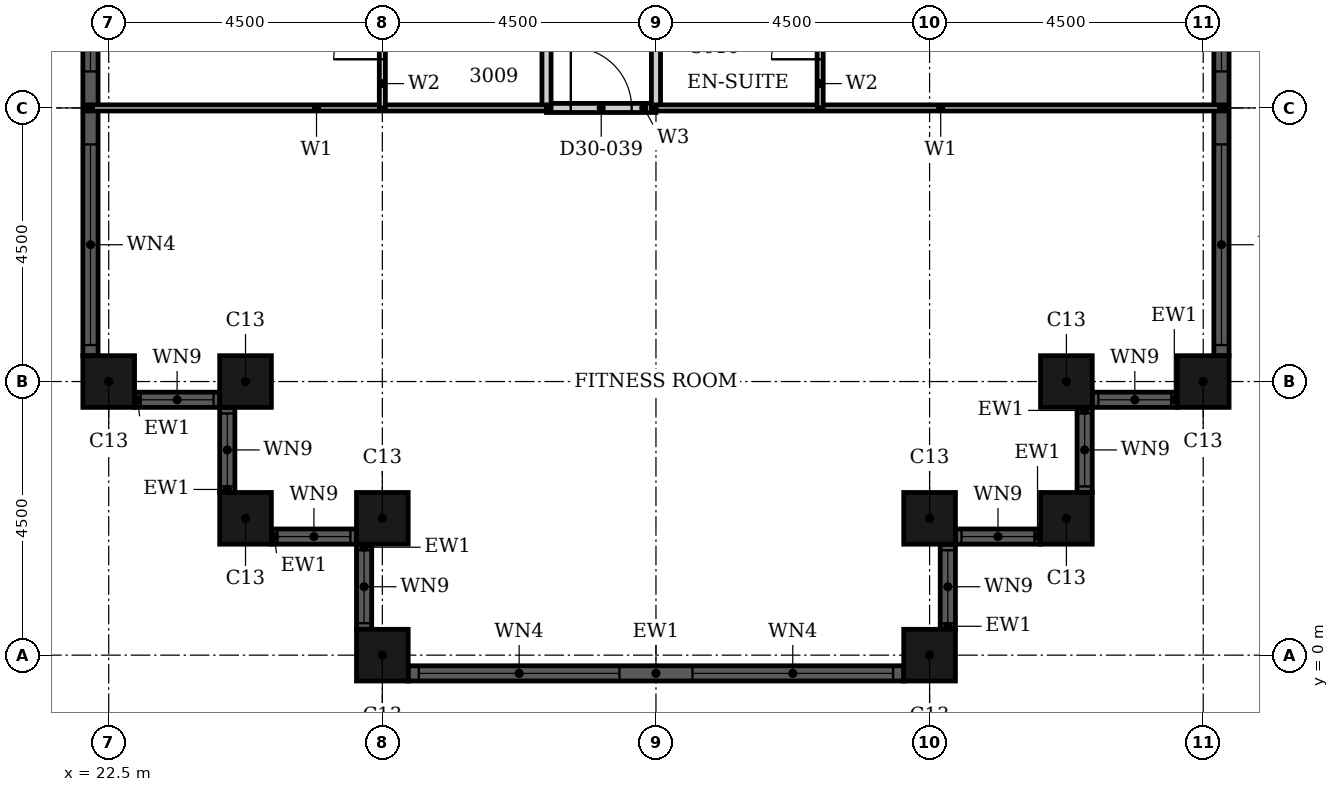
"""IFC4 building model, lengths in metres.
Left out: names, types, materials, properties, quantities, classifications, styles, units other than length and angle.
Written with IfcOpenShell. Run it as: python <this file> out.ifc"""

import sys

from ifc_helpers import new_model, si_unit, direction, frame, frame_2d, origin, origin_2d, place, context, subcontext, project, spatial, rectangle, hollow_rectangle, extrude, element, fill, save


model = new_model("IFC4")
c1 = context("Model", 3, precision=1e-05, world=origin(), true_north=direction((0.0, 1.0)))
c2 = subcontext(c1, "Body", "Model", "MODEL_VIEW")
j1 = project(units=[si_unit("LENGTHUNIT", "METRE"), si_unit("PLANEANGLEUNIT", "RADIAN")], contexts=[c1])
p1 = place(None, origin())
s1 = spatial("IfcSite", under=j1, at=p1, CompositionType="ELEMENT")
p2 = place(p1, origin())
s2 = spatial("IfcBuilding", under=s1, at=p2, CompositionType="ELEMENT")
p3 = place(p2, frame((0.0, 0.0, 122.4)))
s3 = spatial("IfcBuildingStorey", under=s2, at=p3, CompositionType="ELEMENT", Elevation=122.4)
for number, where, z_axis, x_axis in (
    (1, (22.5, 4.5, 0.0), (0.0, 0.0, 1.0), (1.0, 0.0, 0.0)),
    (2, (24.75, 4.5, 0.0), (0.0, 0.0, 1.0), (1.0, 0.0, 0.0)),
    (3, (24.75, 2.25, 0.0), (0.0, 0.0, 1.0), (1.0, 0.0, 0.0)),
    (4, (27.0, 2.25, 0.0), (0.0, 0.0, 1.0), (1.0, 0.0, 0.0)),
    (5, (27.0, 0.0, 0.0), (0.0, 0.0, 1.0), (1.0, 0.0, 0.0)),
    (6, (36.0, 0.0, 0.0), (0.0, 0.0, 1.0), (1.0, 0.0, 0.0)),
    (7, (36.0, 2.25, 0.0), (0.0, 0.0, 1.0), (1.0, 0.0, 0.0)),
    (8, (38.25, 2.25, 0.0), (0.0, 0.0, 1.0), (1.0, 0.0, 0.0)),
    (9, (38.25, 4.5, 0.0), (0.0, 0.0, 1.0), (1.0, 0.0, 0.0)),
    (10, (40.5, 4.5, 0.0), (0.0, 0.0, 1.0), (1.0, 0.0, 0.0)),
):
    element("IfcColumn", number, at=place(p3, frame(where, z_axis=z_axis, x_axis=x_axis)), inside=s3, PredefinedType="COLUMN", context=c2, shape_type="SweptSolid", body=[
        extrude(hollow_rectangle(XDim=0.85, YDim=0.85, WallThickness=0.026, at=origin_2d()), origin(), (0.0, 0.0, 1.0), 3.6),
    ])
p4 = place(p3, frame((22.925, 4.2, 0.0), z_axis=(0.0, 0.0, 1.0), x_axis=(1.0, 0.0, 0.0)))
e11 = element("IfcWall", 11, at=p4, inside=s3, PredefinedType="SOLIDWALL", context=c2, shape_type="SweptSolid", body=[
    extrude(rectangle(XDim=1.4, YDim=0.25, at=frame_2d((0.7, 0.0))), origin(), (0.0, 0.0, 1.0), 3.6),
])
p5 = place(p4, frame((0.1, 0.0, 0.9)))
e12 = element("IfcOpeningElement", 12, at=p5, cuts=e11, PredefinedType="OPENING", context=c2, shape_type="SweptSolid", body=[
    extrude(rectangle(XDim=1.2, YDim=2.08, at=frame_2d((0.6, 1.04))), frame((0.0, 0.135, 0.0), z_axis=(0.0, -1.0, 0.0), x_axis=(1.0, 0.0, 0.0)), (0.0, 0.0, 1.0), 0.27),
])
p6 = place(p3, frame((24.45, 4.075, 0.0), z_axis=(0.0, 0.0, 1.0), x_axis=(0.0, -1.0, 0.0)))
e13 = element("IfcWall", 13, at=p6, inside=s3, PredefinedType="SOLIDWALL", context=c2, shape_type="SweptSolid", body=[
    extrude(rectangle(XDim=1.4, YDim=0.25, at=frame_2d((0.7, 0.0))), origin(), (0.0, 0.0, 1.0), 3.6),
])
p7 = place(p6, frame((0.1, 0.0, 0.9)))
e14 = element("IfcOpeningElement", 14, at=p7, cuts=e13, PredefinedType="OPENING", context=c2, shape_type="SweptSolid", body=[
    extrude(rectangle(XDim=1.2, YDim=2.08, at=frame_2d((0.6, 1.04))), frame((0.0, 0.135, 0.0), z_axis=(0.0, -1.0, 0.0), x_axis=(1.0, 0.0, 0.0)), (0.0, 0.0, 1.0), 0.27),
])
p8 = place(p3, frame((25.175, 1.95, 0.0), z_axis=(0.0, 0.0, 1.0), x_axis=(1.0, 0.0, 0.0)))
e15 = element("IfcWall", 15, at=p8, inside=s3, PredefinedType="SOLIDWALL", context=c2, shape_type="SweptSolid", body=[
    extrude(rectangle(XDim=1.4, YDim=0.25, at=frame_2d((0.7, 0.0))), origin(), (0.0, 0.0, 1.0), 3.6),
])
p9 = place(p8, frame((0.1, 0.0, 0.9)))
e16 = element("IfcOpeningElement", 16, at=p9, cuts=e15, PredefinedType="OPENING", context=c2, shape_type="SweptSolid", body=[
    extrude(rectangle(XDim=1.2, YDim=2.08, at=frame_2d((0.6, 1.04))), frame((0.0, 0.135, 0.0), z_axis=(0.0, -1.0, 0.0), x_axis=(1.0, 0.0, 0.0)), (0.0, 0.0, 1.0), 0.27),
])
p10 = place(p3, frame((26.7, 1.825, 0.0), z_axis=(0.0, 0.0, 1.0), x_axis=(0.0, -1.0, 0.0)))
e17 = element("IfcWall", 17, at=p10, inside=s3, PredefinedType="SOLIDWALL", context=c2, shape_type="SweptSolid", body=[
    extrude(rectangle(XDim=1.4, YDim=0.25, at=frame_2d((0.7, 0.0))), origin(), (0.0, 0.0, 1.0), 3.6),
])
p11 = place(p10, frame((0.1, 0.0, 0.9)))
e18 = element("IfcOpeningElement", 18, at=p11, cuts=e17, PredefinedType="OPENING", context=c2, shape_type="SweptSolid", body=[
    extrude(rectangle(XDim=1.2, YDim=2.08, at=frame_2d((0.6, 1.04))), frame((0.0, 0.135, 0.0), z_axis=(0.0, -1.0, 0.0), x_axis=(1.0, 0.0, 0.0)), (0.0, 0.0, 1.0), 0.27),
])
p12 = place(p3, frame((27.425, -0.3, 0.0), z_axis=(0.0, 0.0, 1.0), x_axis=(1.0, 0.0, 0.0)))
e19 = element("IfcWall", 19, at=p12, inside=s3, PredefinedType="SOLIDWALL", context=c2, shape_type="SweptSolid", body=[
    extrude(rectangle(XDim=8.15, YDim=0.25, at=frame_2d((4.075, 0.0))), origin(), (0.0, 0.0, 1.0), 3.6),
])
p13 = place(p12, frame((0.175, 0.0, 0.9)))
e20 = element("IfcOpeningElement", 20, at=p13, cuts=e19, PredefinedType="OPENING", context=c2, shape_type="SweptSolid", body=[
    extrude(rectangle(XDim=3.3, YDim=2.08, at=frame_2d((1.65, 1.04))), frame((0.0, 0.135, 0.0), z_axis=(0.0, -1.0, 0.0), x_axis=(1.0, 0.0, 0.0)), (0.0, 0.0, 1.0), 0.27),
])
p14 = place(p12, frame((4.675, 0.0, 0.9)))
e21 = element("IfcOpeningElement", 21, at=p14, cuts=e19, PredefinedType="OPENING", context=c2, shape_type="SweptSolid", body=[
    extrude(rectangle(XDim=3.3, YDim=2.08, at=frame_2d((1.65, 1.04))), frame((0.0, 0.135, 0.0), z_axis=(0.0, -1.0, 0.0), x_axis=(1.0, 0.0, 0.0)), (0.0, 0.0, 1.0), 0.27),
])
p15 = place(p3, frame((36.3, 0.425, 0.0), z_axis=(0.0, 0.0, 1.0), x_axis=(0.0, 1.0, 0.0)))
e22 = element("IfcWall", 22, at=p15, inside=s3, PredefinedType="SOLIDWALL", context=c2, shape_type="SweptSolid", body=[
    extrude(rectangle(XDim=1.4, YDim=0.25, at=frame_2d((0.7, 0.0))), origin(), (0.0, 0.0, 1.0), 3.6),
])
p16 = place(p15, frame((0.1, 0.0, 0.9)))
e23 = element("IfcOpeningElement", 23, at=p16, cuts=e22, PredefinedType="OPENING", context=c2, shape_type="SweptSolid", body=[
    extrude(rectangle(XDim=1.2, YDim=2.08, at=frame_2d((0.6, 1.04))), frame((0.0, 0.135, 0.0), z_axis=(0.0, -1.0, 0.0), x_axis=(1.0, 0.0, 0.0)), (0.0, 0.0, 1.0), 0.27),
])
p17 = place(p3, frame((36.425, 1.95, 0.0), z_axis=(0.0, 0.0, 1.0), x_axis=(1.0, 0.0, 0.0)))
e24 = element("IfcWall", 24, at=p17, inside=s3, PredefinedType="SOLIDWALL", context=c2, shape_type="SweptSolid", body=[
    extrude(rectangle(XDim=1.4, YDim=0.25, at=frame_2d((0.7, 0.0))), origin(), (0.0, 0.0, 1.0), 3.6),
])
p18 = place(p17, frame((0.1, 0.0, 0.9)))
e25 = element("IfcOpeningElement", 25, at=p18, cuts=e24, PredefinedType="OPENING", context=c2, shape_type="SweptSolid", body=[
    extrude(rectangle(XDim=1.2, YDim=2.08, at=frame_2d((0.6, 1.04))), frame((0.0, 0.135, 0.0), z_axis=(0.0, -1.0, 0.0), x_axis=(1.0, 0.0, 0.0)), (0.0, 0.0, 1.0), 0.27),
])
p19 = place(p3, frame((38.55, 2.675, 0.0), z_axis=(0.0, 0.0, 1.0), x_axis=(0.0, 1.0, 0.0)))
e26 = element("IfcWall", 26, at=p19, inside=s3, PredefinedType="SOLIDWALL", context=c2, shape_type="SweptSolid", body=[
    extrude(rectangle(XDim=1.4, YDim=0.25, at=frame_2d((0.7, 0.0))), origin(), (0.0, 0.0, 1.0), 3.6),
])
p20 = place(p19, frame((0.1, 0.0, 0.9)))
e27 = element("IfcOpeningElement", 27, at=p20, cuts=e26, PredefinedType="OPENING", context=c2, shape_type="SweptSolid", body=[
    extrude(rectangle(XDim=1.2, YDim=2.08, at=frame_2d((0.6, 1.04))), frame((0.0, 0.135, 0.0), z_axis=(0.0, -1.0, 0.0), x_axis=(1.0, 0.0, 0.0)), (0.0, 0.0, 1.0), 0.27),
])
p21 = place(p3, frame((38.675, 4.2, 0.0), z_axis=(0.0, 0.0, 1.0), x_axis=(1.0, 0.0, 0.0)))
e28 = element("IfcWall", 28, at=p21, inside=s3, PredefinedType="SOLIDWALL", context=c2, shape_type="SweptSolid", body=[
    extrude(rectangle(XDim=1.4, YDim=0.25, at=frame_2d((0.7, 0.0))), origin(), (0.0, 0.0, 1.0), 3.6),
])
p22 = place(p21, frame((0.1, 0.0, 0.9)))
e29 = element("IfcOpeningElement", 29, at=p22, cuts=e28, PredefinedType="OPENING", context=c2, shape_type="SweptSolid", body=[
    extrude(rectangle(XDim=1.2, YDim=2.08, at=frame_2d((0.6, 1.04))), frame((0.0, 0.135, 0.0), z_axis=(0.0, -1.0, 0.0), x_axis=(1.0, 0.0, 0.0)), (0.0, 0.0, 1.0), 0.27),
])
p23 = place(p3, frame((40.8, 4.925, 0.0), z_axis=(0.0, 0.0, 1.0), x_axis=(0.0, 1.0, 0.0)))
e30 = element("IfcWall", 30, at=p23, inside=s3, PredefinedType="SOLIDWALL", context=c2, shape_type="SweptSolid", body=[
    extrude(rectangle(XDim=8.15, YDim=0.25, at=frame_2d((4.075, 0.0))), origin(), (0.0, 0.0, 1.0), 3.6),
])
p24 = place(p23, frame((0.175, 0.0, 0.9)))
e31 = element("IfcOpeningElement", 31, at=p24, cuts=e30, PredefinedType="OPENING", context=c2, shape_type="SweptSolid", body=[
    extrude(rectangle(XDim=3.3, YDim=2.08, at=frame_2d((1.65, 1.04))), frame((0.0, 0.135, 0.0), z_axis=(0.0, -1.0, 0.0), x_axis=(1.0, 0.0, 0.0)), (0.0, 0.0, 1.0), 0.27),
])
p25 = place(p23, frame((4.675, 0.0, 0.9)))
e32 = element("IfcOpeningElement", 32, at=p25, cuts=e30, PredefinedType="OPENING", context=c2, shape_type="SweptSolid", body=[
    extrude(rectangle(XDim=3.3, YDim=2.08, at=frame_2d((1.65, 1.04))), frame((0.0, 0.135, 0.0), z_axis=(0.0, -1.0, 0.0), x_axis=(1.0, 0.0, 0.0)), (0.0, 0.0, 1.0), 0.27),
])
p26 = place(p3, frame((22.2, 13.075, 0.0), z_axis=(0.0, 0.0, 1.0), x_axis=(0.0, -1.0, 0.0)))
e33 = element("IfcWall", 33, at=p26, inside=s3, PredefinedType="SOLIDWALL", context=c2, shape_type="SweptSolid", body=[
    extrude(rectangle(XDim=8.15, YDim=0.25, at=frame_2d((4.075, 0.0))), origin(), (0.0, 0.0, 1.0), 3.6),
])
p27 = place(p26, frame((0.175, 0.0, 0.9)))
e34 = element("IfcOpeningElement", 34, at=p27, cuts=e33, PredefinedType="OPENING", context=c2, shape_type="SweptSolid", body=[
    extrude(rectangle(XDim=3.3, YDim=2.08, at=frame_2d((1.65, 1.04))), frame((0.0, 0.135, 0.0), z_axis=(0.0, -1.0, 0.0), x_axis=(1.0, 0.0, 0.0)), (0.0, 0.0, 1.0), 0.27),
])
p28 = place(p26, frame((4.675, 0.0, 0.9)))
e35 = element("IfcOpeningElement", 35, at=p28, cuts=e33, PredefinedType="OPENING", context=c2, shape_type="SweptSolid", body=[
    extrude(rectangle(XDim=3.3, YDim=2.08, at=frame_2d((1.65, 1.04))), frame((0.0, 0.135, 0.0), z_axis=(0.0, -1.0, 0.0), x_axis=(1.0, 0.0, 0.0)), (0.0, 0.0, 1.0), 0.27),
])
p29 = place(p3, frame((29.7, 9.0, 0.0), z_axis=(0.0, 0.0, 1.0), x_axis=(1.0, 0.0, 0.0)))
e36 = element("IfcWall", 36, at=p29, inside=s3, PredefinedType="PARTITIONING", context=c2, shape_type="SweptSolid", body=[
    extrude(rectangle(XDim=1.8, YDim=0.15, at=frame_2d((0.9, 0.0))), origin(), (0.0, 0.0, 1.0), 3.3),
])
p30 = place(p29, frame((0.4, 0.0, 0.0)))
e37 = element("IfcOpeningElement", 37, at=p30, cuts=e36, PredefinedType="OPENING", context=c2, shape_type="SweptSolid", body=[
    extrude(rectangle(XDim=1.0, YDim=2.1, at=frame_2d((0.5, 1.05))), frame((0.0, 0.085, 0.0), z_axis=(0.0, -1.0, 0.0), x_axis=(1.0, 0.0, 0.0)), (0.0, 0.0, 1.0), 0.17),
])
p31 = place(p3, frame((29.7, 9.0, 0.0), z_axis=(0.0, 0.0, 1.0), x_axis=(0.0, 1.0, 0.0)))
e38 = element("IfcWall", 38, at=p31, inside=s3, PredefinedType="PARTITIONING", context=c2, shape_type="SweptSolid", body=[
    extrude(rectangle(XDim=11.7, YDim=0.15, at=frame_2d((5.85, 0.0))), origin(), (0.0, 0.0, 1.0), 3.3),
])
p32 = place(p31, frame((2.95, 0.0, 0.0)))
e39 = element("IfcOpeningElement", 39, at=p32, cuts=e38, PredefinedType="OPENING", context=c2, shape_type="SweptSolid", body=[
    extrude(rectangle(XDim=1.0, YDim=2.1, at=frame_2d((0.5, 1.05))), frame((0.0, 0.085, 0.0), z_axis=(0.0, -1.0, 0.0), x_axis=(1.0, 0.0, 0.0)), (0.0, 0.0, 1.0), 0.17),
])
p33 = place(p3, frame((31.5, 9.0, 0.0), z_axis=(0.0, 0.0, 1.0), x_axis=(0.0, 1.0, 0.0)))
e40 = element("IfcWall", 40, at=p33, inside=s3, PredefinedType="PARTITIONING", context=c2, shape_type="SweptSolid", body=[
    extrude(rectangle(XDim=11.7, YDim=0.15, at=frame_2d((5.85, 0.0))), origin(), (0.0, 0.0, 1.0), 2.58),
])
p34 = place(p33, frame((2.95, 0.0, 0.0)))
e41 = element("IfcOpeningElement", 41, at=p34, cuts=e40, PredefinedType="OPENING", context=c2, shape_type="SweptSolid", body=[
    extrude(rectangle(XDim=1.0, YDim=2.1, at=frame_2d((0.5, 1.05))), frame((0.0, 0.085, 0.0), z_axis=(0.0, -1.0, 0.0), x_axis=(1.0, 0.0, 0.0)), (0.0, 0.0, 1.0), 0.17),
])
p35 = place(p3, frame((31.5, 9.0, 0.0), z_axis=(0.0, 0.0, 1.0), x_axis=(1.0, 0.0, 0.0)))
e42 = element("IfcWall", 42, at=p35, inside=s3, PredefinedType="PARTITIONING", context=c2, shape_type="SweptSolid", body=[
    extrude(rectangle(XDim=9.365, YDim=0.1, at=frame_2d((4.683, 0.0))), origin(), (0.0, 0.0, 1.0), 3.3),
])
p36 = place(p3, frame((22.135, 9.0, 0.0), z_axis=(0.0, 0.0, 1.0), x_axis=(1.0, 0.0, 0.0)))
e43 = element("IfcWall", 43, at=p36, inside=s3, PredefinedType="PARTITIONING", context=c2, shape_type="SweptSolid", body=[
    extrude(rectangle(XDim=7.565, YDim=0.1, at=frame_2d((3.782, 0.0))), origin(), (0.0, 0.0, 1.0), 3.3),
])
p37 = place(p3, frame((27.0, 9.0, 0.0), z_axis=(0.0, 0.0, 1.0), x_axis=(0.0, 1.0, 0.0)))
e44 = element("IfcWall", 44, at=p37, inside=s3, PredefinedType="PARTITIONING", context=c2, shape_type="SweptSolid", body=[
    extrude(rectangle(XDim=2.4, YDim=0.1, at=frame_2d((1.2, 0.0))), origin(), (0.0, 0.0, 1.0), 2.58),
])
p38 = place(p37, frame((0.8, 0.0, 0.0)))
e45 = element("IfcOpeningElement", 45, at=p38, cuts=e44, PredefinedType="OPENING", context=c2, shape_type="SweptSolid", body=[
    extrude(rectangle(XDim=0.8, YDim=2.1, at=frame_2d((0.4, 1.05))), frame((0.0, 0.06, 0.0), z_axis=(0.0, -1.0, 0.0), x_axis=(1.0, 0.0, 0.0)), (0.0, 0.0, 1.0), 0.12),
])
p39 = place(p3, frame((34.2, 9.0, 0.0), z_axis=(0.0, 0.0, 1.0), x_axis=(0.0, 1.0, 0.0)))
e46 = element("IfcWall", 46, at=p39, inside=s3, PredefinedType="PARTITIONING", context=c2, shape_type="SweptSolid", body=[
    extrude(rectangle(XDim=2.4, YDim=0.1, at=frame_2d((1.2, 0.0))), origin(), (0.0, 0.0, 1.0), 3.3),
])
p40 = place(p39, frame((0.8, 0.0, 0.0)))
e47 = element("IfcOpeningElement", 47, at=p40, cuts=e46, PredefinedType="OPENING", context=c2, shape_type="SweptSolid", body=[
    extrude(rectangle(XDim=0.8, YDim=2.1, at=frame_2d((0.4, 1.05))), frame((0.0, 0.06, 0.0), z_axis=(0.0, -1.0, 0.0), x_axis=(1.0, 0.0, 0.0)), (0.0, 0.0, 1.0), 0.12),
])
p41 = place(p5, origin())
e48 = element("IfcWindow", 48, at=p41, inside=s3, PartitioningType="SINGLE_PANEL", PredefinedType="WINDOW", context=c2, shape_type="SweptSolid", body=[
    extrude(rectangle(XDim=1.2, YDim=2.08, at=frame_2d((0.6, 1.04))), frame((0.0, 0.03, 0.0), z_axis=(0.0, -1.0, 0.0), x_axis=(1.0, 0.0, 0.0)), (0.0, 0.0, 1.0), 0.06),
])
fill(e12, e48)
p42 = place(p7, origin())
e49 = element("IfcWindow", 49, at=p42, inside=s3, PartitioningType="SINGLE_PANEL", PredefinedType="WINDOW", context=c2, shape_type="SweptSolid", body=[
    extrude(rectangle(XDim=1.2, YDim=2.08, at=frame_2d((0.6, 1.04))), frame((0.0, 0.03, 0.0), z_axis=(0.0, -1.0, 0.0), x_axis=(1.0, 0.0, 0.0)), (0.0, 0.0, 1.0), 0.06),
])
fill(e14, e49)
p43 = place(p9, origin())
e50 = element("IfcWindow", 50, at=p43, inside=s3, PartitioningType="SINGLE_PANEL", PredefinedType="WINDOW", context=c2, shape_type="SweptSolid", body=[
    extrude(rectangle(XDim=1.2, YDim=2.08, at=frame_2d((0.6, 1.04))), frame((0.0, 0.03, 0.0), z_axis=(0.0, -1.0, 0.0), x_axis=(1.0, 0.0, 0.0)), (0.0, 0.0, 1.0), 0.06),
])
fill(e16, e50)
p44 = place(p11, origin())
e51 = element("IfcWindow", 51, at=p44, inside=s3, PartitioningType="SINGLE_PANEL", PredefinedType="WINDOW", context=c2, shape_type="SweptSolid", body=[
    extrude(rectangle(XDim=1.2, YDim=2.08, at=frame_2d((0.6, 1.04))), frame((0.0, 0.03, 0.0), z_axis=(0.0, -1.0, 0.0), x_axis=(1.0, 0.0, 0.0)), (0.0, 0.0, 1.0), 0.06),
])
fill(e18, e51)
p45 = place(p13, origin())
e52 = element("IfcWindow", 52, at=p45, inside=s3, PartitioningType="SINGLE_PANEL", PredefinedType="WINDOW", context=c2, shape_type="SweptSolid", body=[
    extrude(rectangle(XDim=3.3, YDim=2.08, at=frame_2d((1.65, 1.04))), frame((0.0, 0.03, 0.0), z_axis=(0.0, -1.0, 0.0), x_axis=(1.0, 0.0, 0.0)), (0.0, 0.0, 1.0), 0.06),
])
fill(e20, e52)
p46 = place(p14, origin())
e53 = element("IfcWindow", 53, at=p46, inside=s3, PartitioningType="SINGLE_PANEL", PredefinedType="WINDOW", context=c2, shape_type="SweptSolid", body=[
    extrude(rectangle(XDim=3.3, YDim=2.08, at=frame_2d((1.65, 1.04))), frame((0.0, 0.03, 0.0), z_axis=(0.0, -1.0, 0.0), x_axis=(1.0, 0.0, 0.0)), (0.0, 0.0, 1.0), 0.06),
])
fill(e21, e53)
p47 = place(p16, origin())
e54 = element("IfcWindow", 54, at=p47, inside=s3, PartitioningType="SINGLE_PANEL", PredefinedType="WINDOW", context=c2, shape_type="SweptSolid", body=[
    extrude(rectangle(XDim=1.2, YDim=2.08, at=frame_2d((0.6, 1.04))), frame((0.0, 0.03, 0.0), z_axis=(0.0, -1.0, 0.0), x_axis=(1.0, 0.0, 0.0)), (0.0, 0.0, 1.0), 0.06),
])
fill(e23, e54)
p48 = place(p18, origin())
e55 = element("IfcWindow", 55, at=p48, inside=s3, PartitioningType="SINGLE_PANEL", PredefinedType="WINDOW", context=c2, shape_type="SweptSolid", body=[
    extrude(rectangle(XDim=1.2, YDim=2.08, at=frame_2d((0.6, 1.04))), frame((0.0, 0.03, 0.0), z_axis=(0.0, -1.0, 0.0), x_axis=(1.0, 0.0, 0.0)), (0.0, 0.0, 1.0), 0.06),
])
fill(e25, e55)
p49 = place(p20, origin())
e56 = element("IfcWindow", 56, at=p49, inside=s3, PartitioningType="SINGLE_PANEL", PredefinedType="WINDOW", context=c2, shape_type="SweptSolid", body=[
    extrude(rectangle(XDim=1.2, YDim=2.08, at=frame_2d((0.6, 1.04))), frame((0.0, 0.03, 0.0), z_axis=(0.0, -1.0, 0.0), x_axis=(1.0, 0.0, 0.0)), (0.0, 0.0, 1.0), 0.06),
])
fill(e27, e56)
p50 = place(p22, origin())
e57 = element("IfcWindow", 57, at=p50, inside=s3, PartitioningType="SINGLE_PANEL", PredefinedType="WINDOW", context=c2, shape_type="SweptSolid", body=[
    extrude(rectangle(XDim=1.2, YDim=2.08, at=frame_2d((0.6, 1.04))), frame((0.0, 0.03, 0.0), z_axis=(0.0, -1.0, 0.0), x_axis=(1.0, 0.0, 0.0)), (0.0, 0.0, 1.0), 0.06),
])
fill(e29, e57)
p51 = place(p24, origin())
e58 = element("IfcWindow", 58, at=p51, inside=s3, PartitioningType="SINGLE_PANEL", PredefinedType="WINDOW", context=c2, shape_type="SweptSolid", body=[
    extrude(rectangle(XDim=3.3, YDim=2.08, at=frame_2d((1.65, 1.04))), frame((0.0, 0.03, 0.0), z_axis=(0.0, -1.0, 0.0), x_axis=(1.0, 0.0, 0.0)), (0.0, 0.0, 1.0), 0.06),
])
fill(e31, e58)
p52 = place(p25, origin())
e59 = element("IfcWindow", 59, at=p52, inside=s3, PartitioningType="SINGLE_PANEL", PredefinedType="WINDOW", context=c2, shape_type="SweptSolid", body=[
    extrude(rectangle(XDim=3.3, YDim=2.08, at=frame_2d((1.65, 1.04))), frame((0.0, 0.03, 0.0), z_axis=(0.0, -1.0, 0.0), x_axis=(1.0, 0.0, 0.0)), (0.0, 0.0, 1.0), 0.06),
])
fill(e32, e59)
p53 = place(p27, origin())
e60 = element("IfcWindow", 60, at=p53, inside=s3, PartitioningType="SINGLE_PANEL", PredefinedType="WINDOW", context=c2, shape_type="SweptSolid", body=[
    extrude(rectangle(XDim=3.3, YDim=2.08, at=frame_2d((1.65, 1.04))), frame((0.0, 0.03, 0.0), z_axis=(0.0, -1.0, 0.0), x_axis=(1.0, 0.0, 0.0)), (0.0, 0.0, 1.0), 0.06),
])
fill(e34, e60)
p54 = place(p28, origin())
e61 = element("IfcWindow", 61, at=p54, inside=s3, PartitioningType="SINGLE_PANEL", PredefinedType="WINDOW", context=c2, shape_type="SweptSolid", body=[
    extrude(rectangle(XDim=3.3, YDim=2.08, at=frame_2d((1.65, 1.04))), frame((0.0, 0.03, 0.0), z_axis=(0.0, -1.0, 0.0), x_axis=(1.0, 0.0, 0.0)), (0.0, 0.0, 1.0), 0.06),
])
fill(e35, e61)
p55 = place(p38, origin())
e62 = element("IfcDoor", 62, at=p55, inside=s3, OperationType="SINGLE_SWING_RIGHT", PredefinedType="DOOR", context=c2, shape_type="SweptSolid", body=[
    extrude(rectangle(XDim=0.8, YDim=2.1, at=frame_2d((0.4, 1.05))), frame((0.0, 0.025, 0.0), z_axis=(0.0, -1.0, 0.0), x_axis=(1.0, 0.0, 0.0)), (0.0, 0.0, 1.0), 0.05),
])
fill(e45, e62)
p56 = place(p40, origin())
e63 = element("IfcDoor", 63, at=p56, inside=s3, OperationType="SINGLE_SWING_LEFT", PredefinedType="DOOR", context=c2, shape_type="SweptSolid", body=[
    extrude(rectangle(XDim=0.8, YDim=2.1, at=frame_2d((0.4, 1.05))), frame((0.0, 0.025, 0.0), z_axis=(0.0, -1.0, 0.0), x_axis=(1.0, 0.0, 0.0)), (0.0, 0.0, 1.0), 0.05),
])
fill(e47, e63)
p57 = place(p30, origin())
e64 = element("IfcDoor", 64, at=p57, inside=s3, OperationType="SINGLE_SWING_RIGHT", PredefinedType="DOOR", context=c2, shape_type="SweptSolid", body=[
    extrude(rectangle(XDim=1.0, YDim=2.1, at=frame_2d((0.5, 1.05))), frame((0.0, 0.025, 0.0), z_axis=(0.0, -1.0, 0.0), x_axis=(1.0, 0.0, 0.0)), (0.0, 0.0, 1.0), 0.05),
])
fill(e37, e64)
save(model, sys.argv[1])
